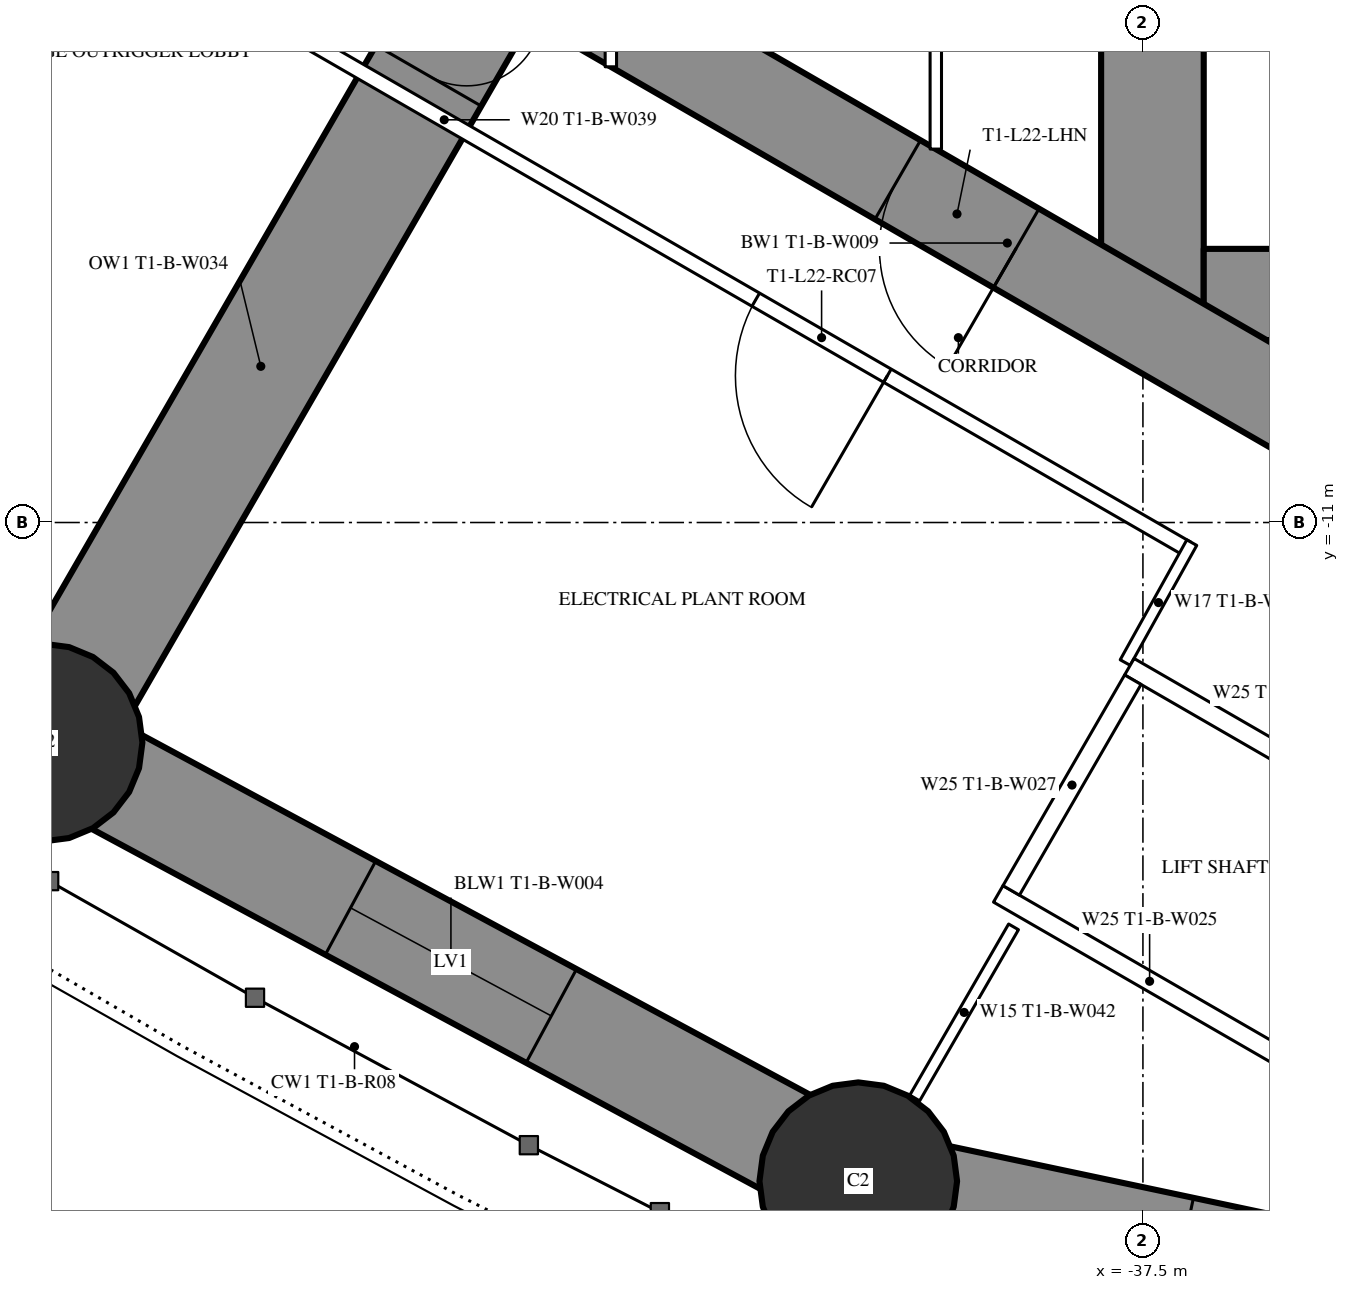
"""IFC4 building model, lengths in metres.
Left out: names, types, materials, properties, quantities, classifications, styles, units other than length and angle.
Written with IfcOpenShell. Run it as: python <this file> out.ifc"""

import sys

from ifc_helpers import new_model, si_unit, direction, frame, frame_2d, origin, origin_2d, place, context, subcontext, project, spatial, rectangle, hollow_circle, extrude, element, fill, save


model = new_model("IFC4")
c1 = context("Model", 3, precision=1e-05, world=origin(), true_north=direction((0.0, 1.0)))
c2 = subcontext(c1, "Body", "Model", "MODEL_VIEW")
j1 = project(units=[si_unit("LENGTHUNIT", "METRE"), si_unit("PLANEANGLEUNIT", "RADIAN")], contexts=[c1])
p1 = place(None, origin())
s1 = spatial("IfcSite", under=j1, at=p1, CompositionType="ELEMENT")
p2 = place(p1, origin())
s2 = spatial("IfcBuilding", under=s1, at=p2, CompositionType="ELEMENT")
p3 = place(p2, frame((0.0, 0.0, 87.0)))
s3 = spatial("IfcBuildingStorey", under=s2, at=p3, CompositionType="ELEMENT", Elevation=87.0)
for number, where, z_axis, x_axis in (
    (1, (-51.963, -13.895, 0.0), (0.0, 0.0, 1.0), (1.0, 0.0, 0.0)),
    (2, (-41.245, -19.666, 0.0), (0.0, 0.0, 1.0), (1.0, 0.0, 0.0)),
):
    element("IfcColumn", number, at=place(p3, frame(where, z_axis=z_axis, x_axis=x_axis)), inside=s3, PredefinedType="COLUMN", context=c2, shape_type="SweptSolid", body=[
        extrude(hollow_circle(Radius=1.3, WallThickness=0.1, at=origin_2d()), origin(), (0.0, 0.0, 1.0), 3.6),
    ])
p4 = place(p3, frame((-37.375, 8.6, 0.0), z_axis=(0.0, 0.0, 1.0), x_axis=(0.0, -1.0, 0.0)))
e3 = element("IfcWall", 3, at=p4, inside=s3, PredefinedType="SHEAR", context=c2, shape_type="SweptSolid", body=[
    extrude(rectangle(XDim=17.2, YDim=1.35, at=frame_2d((8.6, 0.0))), origin(), (0.0, 0.0, 1.0), 3.6),
])
p5 = place(p4, frame((7.7, 0.0, 0.0)))
e4 = element("IfcOpeningElement", 4, at=p5, cuts=e3, PredefinedType="OPENING", context=c2, shape_type="SweptSolid", body=[
    extrude(rectangle(XDim=1.8, YDim=2.2, at=frame_2d((0.9, 1.1))), frame((0.0, 0.685, 0.0), z_axis=(0.0, -1.0, 0.0), x_axis=(1.0, 0.0, 0.0)), (0.0, 0.0, 1.0), 1.37),
])
p6 = place(p3, frame((-28.3, -8.0, 0.0), z_axis=(0.0, 0.0, 1.0), x_axis=(-1.0, 0.0, 0.0)))
e5 = element("IfcWall", 5, at=p6, inside=s3, PredefinedType="SHEAR", context=c2, shape_type="SweptSolid", body=[
    extrude(rectangle(XDim=8.4, YDim=1.2, at=frame_2d((4.2, 0.0))), origin(), (0.0, 0.0, 1.0), 3.6),
])
p7 = place(p6, frame((0.25, 0.0, 0.0)))
e6 = element("IfcOpeningElement", 6, at=p7, cuts=e5, PredefinedType="OPENING", context=c2, shape_type="SweptSolid", body=[
    extrude(rectangle(XDim=1.0, YDim=2.2, at=frame_2d((0.5, 1.1))), frame((0.0, 0.61, 0.0), z_axis=(0.0, -1.0, 0.0), x_axis=(1.0, 0.0, 0.0)), (0.0, 0.0, 1.0), 1.22),
])
p8 = place(p3, frame((-27.2, -14.3, 0.0), z_axis=(0.0, 0.0, 1.0), x_axis=(-0.866024021859, 0.500002393557, 0.0)))
e7 = element("IfcWall", 7, at=p8, inside=s3, PredefinedType="SHEAR", context=c2, shape_type="SweptSolid", body=[
    extrude(rectangle(XDim=27.907, YDim=1.2, at=frame_2d((13.954, 0.0))), origin(), (0.0, 0.0, 1.0), 3.6),
])
p9 = place(p8, frame((4.6, 0.0, 0.0)))
e8 = element("IfcOpeningElement", 8, at=p9, cuts=e7, PredefinedType="OPENING", context=c2, shape_type="SweptSolid", body=[
    extrude(rectangle(XDim=1.0, YDim=2.2, at=frame_2d((0.5, 1.1))), frame((0.0, 0.61, 0.0), z_axis=(0.0, -1.0, 0.0), x_axis=(1.0, 0.0, 0.0)), (0.0, 0.0, 1.0), 1.22),
])
p10 = place(p8, frame((13.818, 0.0, 0.0)))
e9 = element("IfcOpeningElement", 9, at=p10, cuts=e7, PredefinedType="OPENING", context=c2, shape_type="SweptSolid", body=[
    extrude(rectangle(XDim=1.8, YDim=2.2, at=frame_2d((0.9, 1.1))), frame((0.0, 0.61, 0.0), z_axis=(0.0, -1.0, 0.0), x_axis=(1.0, 0.0, 0.0)), (0.0, 0.0, 1.0), 1.22),
])
p11 = place(p3, frame((-46.248, -3.996, 0.0), z_axis=(0.0, 0.0, 1.0), x_axis=(-0.499993613132, -0.866029091213, 0.0)))
e10 = element("IfcWall", 10, at=p11, inside=s3, PredefinedType="SHEAR", context=c2, shape_type="SweptSolid", body=[
    extrude(rectangle(XDim=11.431, YDim=1.6, at=frame_2d((5.715, 0.0))), origin(), (0.0, 0.0, 1.0), 3.6),
])
p12 = place(p11, frame((0.3, 0.0, 0.0)))
e11 = element("IfcOpeningElement", 11, at=p12, cuts=e10, PredefinedType="OPENING", context=c2, shape_type="SweptSolid", body=[
    extrude(rectangle(XDim=1.0, YDim=2.2, at=frame_2d((0.5, 1.1))), frame((0.0, 0.81, 0.0), z_axis=(0.0, -1.0, 0.0), x_axis=(1.0, 0.0, 0.0)), (0.0, 0.0, 1.0), 1.62),
])
p13 = place(p3, frame((-62.287, -7.445, 0.0), z_axis=(0.0, 0.0, 1.0), x_axis=(0.848062521637, -0.529896177939, 0.0)))
e12 = element("IfcWall", 12, at=p13, inside=s3, PredefinedType="SHEAR", context=c2, shape_type="SweptSolid", body=[
    extrude(rectangle(XDim=12.173, YDim=1.4, at=frame_2d((6.086, 0.0))), origin(), (0.0, 0.0, 1.0), 3.6),
])
p14 = place(p13, frame((4.586, 0.0, 0.6)))
e13 = element("IfcOpeningElement", 13, at=p14, cuts=e12, PredefinedType="OPENING", context=c2, shape_type="SweptSolid", body=[
    extrude(rectangle(XDim=3.0, YDim=1.2, at=frame_2d((1.5, 0.6))), frame((0.0, 0.71, 0.0), z_axis=(0.0, -1.0, 0.0), x_axis=(1.0, 0.0, 0.0)), (0.0, 0.0, 1.0), 1.42),
])
p15 = place(p3, frame((-51.963, -13.895, 0.0), z_axis=(0.0, 0.0, 1.0), x_axis=(0.880492350889, -0.474060354835, 0.0)))
e14 = element("IfcWall", 14, at=p15, inside=s3, PredefinedType="SHEAR", context=c2, shape_type="SweptSolid", body=[
    extrude(rectangle(XDim=12.173, YDim=1.4, at=frame_2d((6.086, 0.0))), origin(), (0.0, 0.0, 1.0), 3.6),
])
p16 = place(p15, frame((4.586, 0.0, 0.6)))
e15 = element("IfcOpeningElement", 15, at=p16, cuts=e14, PredefinedType="OPENING", context=c2, shape_type="SweptSolid", body=[
    extrude(rectangle(XDim=3.0, YDim=1.2, at=frame_2d((1.5, 0.6))), frame((0.0, 0.71, 0.0), z_axis=(0.0, -1.0, 0.0), x_axis=(1.0, 0.0, 0.0)), (0.0, 0.0, 1.0), 1.42),
])
p17 = place(p3, frame((-41.245, -19.666, 0.0), z_axis=(0.0, 0.0, 1.0), x_axis=(0.978282156247, -0.207277646573, 0.0)))
e16 = element("IfcWall", 16, at=p17, inside=s3, PredefinedType="SHEAR", context=c2, shape_type="SweptSolid", body=[
    extrude(rectangle(XDim=11.718, YDim=1.4, at=frame_2d((5.859, 0.0))), origin(), (0.0, 0.0, 1.0), 3.6),
])
p18 = place(p17, frame((4.359, 0.0, 0.6)))
e17 = element("IfcOpeningElement", 17, at=p18, cuts=e16, PredefinedType="OPENING", context=c2, shape_type="SweptSolid", body=[
    extrude(rectangle(XDim=3.0, YDim=1.2, at=frame_2d((1.5, 0.6))), frame((0.0, 0.71, 0.0), z_axis=(0.0, -1.0, 0.0), x_axis=(1.0, 0.0, 0.0)), (0.0, 0.0, 1.0), 1.42),
])
p19 = place(p3, frame((-39.202, -16.32, 0.0), z_axis=(0.0, 0.0, 1.0), x_axis=(-0.49997716683, -0.86603858612, 0.0)))
e18 = element("IfcWall", 18, at=p19, inside=s3, PredefinedType="PARTITIONING", context=c2, shape_type="SweptSolid", body=[
    extrude(rectangle(XDim=2.6, YDim=0.15, at=frame_2d((1.3, 0.0))), origin(), (0.0, 0.0, 1.0), 3.35),
])
p20 = place(p3, frame((-36.92, -11.344, 0.0), z_axis=(0.0, 0.0, 1.0), x_axis=(-0.866028313256, 0.499994960614, 0.0)))
e19 = element("IfcWall", 19, at=p20, inside=s3, PredefinedType="PARTITIONING", context=c2, shape_type="SweptSolid", body=[
    extrude(rectangle(XDim=22.568, YDim=0.2, at=frame_2d((11.284, 0.0))), origin(), (0.0, 0.0, 1.0), 3.35),
])
p21 = place(p20, frame((15.994, 0.0, 0.0)))
e20 = element("IfcOpeningElement", 20, at=p21, cuts=e19, PredefinedType="OPENING", context=c2, shape_type="SweptSolid", body=[
    extrude(rectangle(XDim=1.8, YDim=2.2, at=frame_2d((0.9, 1.1))), frame((0.0, 0.11, 0.0), z_axis=(0.0, -1.0, 0.0), x_axis=(1.0, 0.0, 0.0)), (0.0, 0.0, 1.0), 0.22),
])
p22 = place(p20, frame((4.551, 0.0, 0.0)))
e21 = element("IfcOpeningElement", 21, at=p22, cuts=e19, PredefinedType="OPENING", context=c2, shape_type="SweptSolid", body=[
    extrude(rectangle(XDim=2.0, YDim=2.4, at=frame_2d((1.0, 1.2))), frame((0.0, 0.11, 0.0), z_axis=(0.0, -1.0, 0.0), x_axis=(1.0, 0.0, 0.0)), (0.0, 0.0, 1.0), 0.22),
])
p23 = place(p3, frame((-36.857, -11.265, 0.0), z_axis=(0.0, 0.0, 1.0), x_axis=(-0.485482130951, -0.874246590229, 0.0)))
e22 = element("IfcWall", 22, at=p23, inside=s3, PredefinedType="PARTITIONING", context=c2, shape_type="SweptSolid", body=[
    extrude(rectangle(XDim=1.805, YDim=0.15, at=frame_2d((0.902, 0.0))), origin(), (0.0, 0.0, 1.0), 3.35),
])
p24 = place(p3, frame((-40.225, 6.087, 0.0), z_axis=(0.0, 0.0, 1.0), x_axis=(0.0, -1.0, 0.0)))
e23 = element("IfcWall", 23, at=p24, inside=s3, PredefinedType="PARTITIONING", context=c2, shape_type="SweptSolid", body=[
    extrude(rectangle(XDim=12.174, YDim=0.15, at=frame_2d((6.087, 0.0))), origin(), (0.0, 0.0, 1.0), 3.35),
])
p25 = place(p24, frame((5.187, 0.0, 0.0)))
e24 = element("IfcOpeningElement", 24, at=p25, cuts=e23, PredefinedType="OPENING", context=c2, shape_type="SweptSolid", body=[
    extrude(rectangle(XDim=1.8, YDim=2.2, at=frame_2d((0.9, 1.1))), frame((0.0, 0.085, 0.0), z_axis=(0.0, -1.0, 0.0), x_axis=(1.0, 0.0, 0.0)), (0.0, 0.0, 1.0), 0.17),
])
p26 = place(p3, frame((-44.5, 4.169, 0.0), z_axis=(0.0, 0.0, 1.0), x_axis=(0.0, -1.0, 0.0)))
e25 = element("IfcWall", 25, at=p26, inside=s3, PredefinedType="PARTITIONING", context=c2, shape_type="SweptSolid", body=[
    extrude(rectangle(XDim=9.173, YDim=0.15, at=frame_2d((4.587, 0.0))), origin(), (0.0, 0.0, 1.0), 3.35),
])
p27 = place(p26, frame((3.669, 0.0, 0.0)))
e26 = element("IfcOpeningElement", 26, at=p27, cuts=e25, PredefinedType="OPENING", context=c2, shape_type="SweptSolid", body=[
    extrude(rectangle(XDim=1.0, YDim=2.2, at=frame_2d((0.5, 1.1))), frame((0.0, 0.085, 0.0), z_axis=(0.0, -1.0, 0.0), x_axis=(1.0, 0.0, 0.0)), (0.0, 0.0, 1.0), 0.17),
])
p28 = place(p3, frame((-33.696, -15.197, 0.0), z_axis=(0.0, 0.0, 1.0), x_axis=(-0.865976953817, 0.500083908417, 0.0)))
e27 = element("IfcWall", 27, at=p28, inside=s3, PredefinedType="PARTITIONING", context=c2, shape_type="SweptSolid", body=[
    extrude(rectangle(XDim=4.599, YDim=0.25, at=frame_2d((2.3, 0.0))), origin(), (0.0, 0.0, 1.0), 3.35),
])
p29 = place(p3, frame((-35.42, -18.186, 0.0), z_axis=(0.0, 0.0, 1.0), x_axis=(-0.865990227814, 0.50006092162, 0.0)))
e28 = element("IfcWall", 28, at=p29, inside=s3, PredefinedType="PARTITIONING", context=c2, shape_type="SweptSolid", body=[
    extrude(rectangle(XDim=4.6, YDim=0.25, at=frame_2d((2.3, 0.0))), origin(), (0.0, 0.0, 1.0), 3.35),
])
p30 = place(p3, frame((-37.633, -13.068, 0.0), z_axis=(0.0, 0.0, 1.0), x_axis=(-0.499872130319, -0.866099216793, 0.0)))
e29 = element("IfcWall", 29, at=p30, inside=s3, PredefinedType="PARTITIONING", context=c2, shape_type="SweptSolid", body=[
    extrude(rectangle(XDim=3.2, YDim=0.25, at=frame_2d((1.6, 0.0))), origin(), (0.0, 0.0, 1.0), 3.35),
])
p31 = place(p16, origin())
e30 = element("IfcWindow", 30, at=p31, inside=s3, PartitioningType="SINGLE_PANEL", PredefinedType="WINDOW", context=c2, shape_type="SweptSolid", body=[
    extrude(rectangle(XDim=3.0, YDim=1.2, at=frame_2d((1.5, 0.6))), frame((0.0, 0.03, 0.0), z_axis=(0.0, -1.0, 0.0), x_axis=(1.0, 0.0, 0.0)), (0.0, 0.0, 1.0), 0.06),
])
fill(e15, e30)
p32 = place(p12, origin())
e31 = element("IfcDoor", 31, at=p32, inside=s3, OperationType="SINGLE_SWING_LEFT", PredefinedType="DOOR", context=c2, shape_type="SweptSolid", body=[
    extrude(rectangle(XDim=1.0, YDim=2.2, at=frame_2d((0.5, 1.1))), frame((0.0, 0.025, 0.0), z_axis=(0.0, -1.0, 0.0), x_axis=(1.0, 0.0, 0.0)), (0.0, 0.0, 1.0), 0.05),
])
fill(e11, e31)
p33 = place(p22, origin())
e32 = element("IfcDoor", 32, at=p33, inside=s3, OperationType="DOUBLE_DOOR_SINGLE_SWING", PredefinedType="DOOR", context=c2, shape_type="SweptSolid", body=[
    extrude(rectangle(XDim=2.0, YDim=2.4, at=frame_2d((1.0, 1.2))), frame((0.0, 0.025, 0.0), z_axis=(0.0, -1.0, 0.0), x_axis=(1.0, 0.0, 0.0)), (0.0, 0.0, 1.0), 0.05),
])
fill(e21, e32)
p34 = place(p10, origin())
e33 = element("IfcDoor", 33, at=p34, inside=s3, OperationType="DOUBLE_DOOR_SINGLE_SWING", PredefinedType="DOOR", context=c2, shape_type="SweptSolid", body=[
    extrude(rectangle(XDim=1.8, YDim=2.2, at=frame_2d((0.9, 1.1))), frame((0.0, 0.025, 0.0), z_axis=(0.0, -1.0, 0.0), x_axis=(1.0, 0.0, 0.0)), (0.0, 0.0, 1.0), 0.05),
])
fill(e9, e33)
save(model, sys.argv[1])
